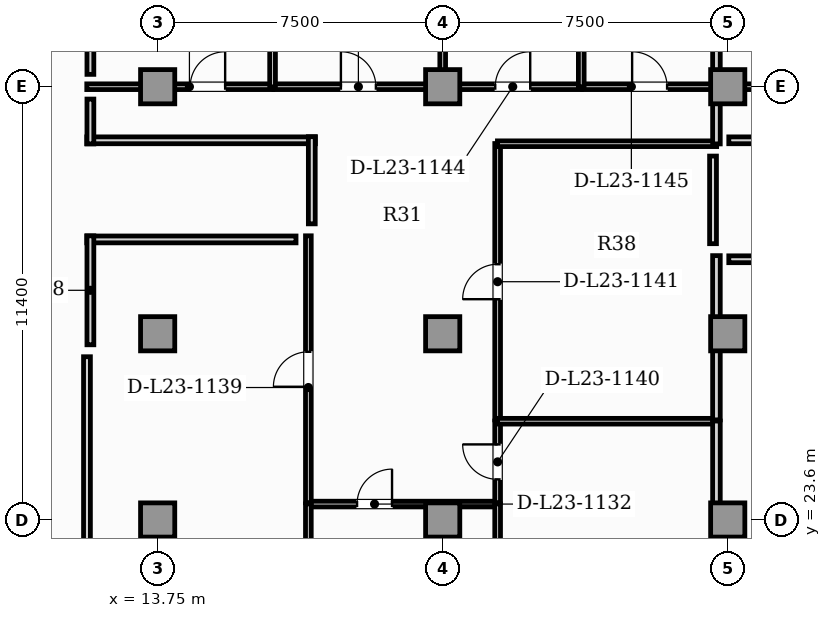
"""IFC4 building model, lengths in metres.
Left out: names, types, materials, properties, quantities, classifications, styles, units other than length and angle.
Written with IfcOpenShell. Run it as: python <this file> out.ifc"""

import sys

from ifc_helpers import new_model, si_unit, direction, frame, frame_2d, origin, origin_2d, place, context, subcontext, project, spatial, rectangle, extrude, element, fill, save


model = new_model("IFC4")
c1 = context("Model", 3, precision=1e-05, world=origin(), true_north=direction((0.0, 1.0)))
c2 = subcontext(c1, "Body", "Model", "MODEL_VIEW")
j1 = project(units=[si_unit("LENGTHUNIT", "METRE"), si_unit("PLANEANGLEUNIT", "RADIAN")], contexts=[c1])
p1 = place(None, origin())
s1 = spatial("IfcSite", under=j1, at=p1, CompositionType="ELEMENT")
p2 = place(p1, origin())
s2 = spatial("IfcBuilding", under=s1, at=p2, CompositionType="ELEMENT")
p3 = place(p2, frame((0.0, 0.0, 96.45)))
s3 = spatial("IfcBuildingStorey", under=s2, at=p3, CompositionType="ELEMENT", Elevation=96.45)
for number, where, z_axis, x_axis in (
    (1, (13.75, 23.6, 0.0), (0.0, 0.0, 1.0), (1.0, 0.0, 0.0)),
    (2, (21.25, 23.6, 0.0), (0.0, 0.0, 1.0), (1.0, 0.0, 0.0)),
    (3, (28.75, 23.6, 0.0), (0.0, 0.0, 1.0), (1.0, 0.0, 0.0)),
    (4, (13.75, 28.5, 0.0), (0.0, 0.0, 1.0), (1.0, 0.0, 0.0)),
    (5, (21.25, 28.5, 0.0), (0.0, 0.0, 1.0), (1.0, 0.0, 0.0)),
    (6, (28.75, 28.5, 0.0), (0.0, 0.0, 1.0), (1.0, 0.0, 0.0)),
    (7, (13.75, 35.0, 0.0), (0.0, 0.0, 1.0), (1.0, 0.0, 0.0)),
    (8, (21.25, 35.0, 0.0), (0.0, 0.0, 1.0), (1.0, 0.0, 0.0)),
    (9, (28.75, 35.0, 0.0), (0.0, 0.0, 1.0), (1.0, 0.0, 0.0)),
):
    element("IfcColumn", number, at=place(p3, frame(where, z_axis=z_axis, x_axis=x_axis)), inside=s3, PredefinedType="COLUMN", context=c2, shape_type="SweptSolid", body=[
        extrude(rectangle(XDim=0.9, YDim=0.9, at=origin_2d()), origin(), (0.0, 0.0, 1.0), 3.85),
    ])
p4 = place(p3, frame((11.89, 17.465, 0.0), z_axis=(0.0, 0.0, 1.0), x_axis=(0.0, 1.0, 0.0)))
e10 = element("IfcWall", 10, at=p4, inside=s3, PredefinedType="PARTITIONING", context=c2, shape_type="SweptSolid", body=[
    extrude(rectangle(XDim=10.43, YDim=0.18, at=frame_2d((5.215, 0.0))), origin(), (0.0, 0.0, 1.0), 3.6),
])
p5 = place(p3, frame((17.71, 24.019, 0.0), z_axis=(0.0, 0.0, 1.0), x_axis=(1.0, 0.0, 0.0)))
e11 = element("IfcWall", 11, at=p5, inside=s3, PredefinedType="PARTITIONING", context=c2, shape_type="SweptSolid", body=[
    extrude(rectangle(XDim=4.99, YDim=0.15, at=frame_2d((2.495, 0.0))), origin(), (0.0, 0.0, 1.0), 3.6),
])
p6 = place(p5, frame((1.287, 0.0, 0.0)))
e12 = element("IfcOpeningElement", 12, at=p6, cuts=e11, PredefinedType="OPENING", context=c2, shape_type="SweptSolid", body=[
    extrude(rectangle(XDim=0.92, YDim=2.1, at=frame_2d((0.46, 1.05))), frame((0.0, 0.085, 0.0), z_axis=(0.0, -1.0, 0.0), x_axis=(1.0, 0.0, 0.0)), (0.0, 0.0, 1.0), 0.17),
])
p7 = place(p3, frame((17.716, 17.465, 0.0), z_axis=(0.0, 0.0, 1.0), x_axis=(0.0, 1.0, 0.0)))
e13 = element("IfcWall", 13, at=p7, inside=s3, PredefinedType="PARTITIONING", context=c2, shape_type="SweptSolid", body=[
    extrude(rectangle(XDim=6.559, YDim=0.15, at=frame_2d((3.279, 0.0))), origin(), (0.0, 0.0, 1.0), 3.6),
])
p8 = place(p7, frame((2.819, 0.0, 0.0)))
e14 = element("IfcOpeningElement", 14, at=p8, cuts=e13, PredefinedType="OPENING", context=c2, shape_type="SweptSolid", body=[
    extrude(rectangle(XDim=0.92, YDim=2.1, at=frame_2d((0.46, 1.05))), frame((0.0, 0.085, 0.0), z_axis=(0.0, -1.0, 0.0), x_axis=(1.0, 0.0, 0.0)), (0.0, 0.0, 1.0), 0.17),
])
p9 = place(p3, frame((22.696, 20.97, 0.0), z_axis=(0.0, 0.0, 1.0), x_axis=(0.0, 1.0, 0.0)))
e15 = element("IfcWall", 15, at=p9, inside=s3, PredefinedType="PARTITIONING", context=c2, shape_type="SweptSolid", body=[
    extrude(rectangle(XDim=3.054, YDim=0.15, at=frame_2d((1.527, 0.0))), origin(), (0.0, 0.0, 1.0), 3.6),
])
p10 = place(p9, frame((1.067, 0.0, 0.0)))
e16 = element("IfcOpeningElement", 16, at=p10, cuts=e15, PredefinedType="OPENING", context=c2, shape_type="SweptSolid", body=[
    extrude(rectangle(XDim=0.92, YDim=2.1, at=frame_2d((0.46, 1.05))), frame((0.0, 0.085, 0.0), z_axis=(0.0, -1.0, 0.0), x_axis=(1.0, 0.0, 0.0)), (0.0, 0.0, 1.0), 0.17),
])
p11 = place(p3, frame((17.716, 24.054, 0.0), z_axis=(0.0, 0.0, 1.0), x_axis=(0.0, 1.0, 0.0)))
e17 = element("IfcWall", 17, at=p11, inside=s3, PredefinedType="PARTITIONING", context=c2, shape_type="SweptSolid", body=[
    extrude(rectangle(XDim=7.023, YDim=0.15, at=frame_2d((3.512, 0.0))), origin(), (0.0, 0.0, 1.0), 3.6),
])
p12 = place(p11, frame((3.052, 0.0, 0.0)))
e18 = element("IfcOpeningElement", 18, at=p12, cuts=e17, PredefinedType="OPENING", context=c2, shape_type="SweptSolid", body=[
    extrude(rectangle(XDim=0.92, YDim=2.1, at=frame_2d((0.46, 1.05))), frame((0.0, 0.085, 0.0), z_axis=(0.0, -1.0, 0.0), x_axis=(1.0, 0.0, 0.0)), (0.0, 0.0, 1.0), 0.17),
])
p13 = place(p3, frame((22.696, 24.054, 0.0), z_axis=(0.0, 0.0, 1.0), x_axis=(0.0, 1.0, 0.0)))
e19 = element("IfcWall", 19, at=p13, inside=s3, PredefinedType="PARTITIONING", context=c2, shape_type="SweptSolid", body=[
    extrude(rectangle(XDim=2.15, YDim=0.15, at=frame_2d((1.075, 0.0))), origin(), (0.0, 0.0, 1.0), 3.6),
])
p14 = place(p13, frame((0.615, 0.0, 0.0)))
e20 = element("IfcOpeningElement", 20, at=p14, cuts=e19, PredefinedType="OPENING", context=c2, shape_type="SweptSolid", body=[
    extrude(rectangle(XDim=0.92, YDim=2.1, at=frame_2d((0.46, 1.05))), frame((0.0, 0.085, 0.0), z_axis=(0.0, -1.0, 0.0), x_axis=(1.0, 0.0, 0.0)), (0.0, 0.0, 1.0), 0.17),
])
p15 = place(p3, frame((22.696, 26.234, 0.0), z_axis=(0.0, 0.0, 1.0), x_axis=(0.0, 1.0, 0.0)))
e21 = element("IfcWall", 21, at=p15, inside=s3, PredefinedType="PARTITIONING", context=c2, shape_type="SweptSolid", body=[
    extrude(rectangle(XDim=7.271, YDim=0.15, at=frame_2d((3.636, 0.0))), origin(), (0.0, 0.0, 1.0), 3.6),
])
p16 = place(p15, frame((3.176, 0.0, 0.0)))
e22 = element("IfcOpeningElement", 22, at=p16, cuts=e21, PredefinedType="OPENING", context=c2, shape_type="SweptSolid", body=[
    extrude(rectangle(XDim=0.92, YDim=2.1, at=frame_2d((0.46, 1.05))), frame((0.0, 0.085, 0.0), z_axis=(0.0, -1.0, 0.0), x_axis=(1.0, 0.0, 0.0)), (0.0, 0.0, 1.0), 0.17),
])
p17 = place(p3, frame((22.69, 33.5, 0.0), z_axis=(0.0, 0.0, 1.0), x_axis=(1.0, 0.0, 0.0)))
e23 = element("IfcWall", 23, at=p17, inside=s3, PredefinedType="PARTITIONING", context=c2, shape_type="SweptSolid", body=[
    extrude(rectangle(XDim=5.768, YDim=0.15, at=frame_2d((2.884, 0.0))), origin(), (0.0, 0.0, 1.0), 3.6),
])
p18 = place(p3, frame((11.885, 35.0, 0.0), z_axis=(0.0, 0.0, 1.0), x_axis=(1.0, 0.0, 0.0)))
e24 = element("IfcWall", 24, at=p18, inside=s3, PredefinedType="PARTITIONING", context=c2, shape_type="SweptSolid", body=[
    extrude(rectangle(XDim=4.893, YDim=0.15, at=frame_2d((2.447, 0.0))), origin(), (0.0, 0.0, 1.0), 2.983),
])
p19 = place(p18, frame((2.721, 0.0, 0.0)))
e25 = element("IfcOpeningElement", 25, at=p19, cuts=e24, PredefinedType="OPENING", context=c2, shape_type="SweptSolid", body=[
    extrude(rectangle(XDim=0.92, YDim=2.1, at=frame_2d((0.46, 1.05))), frame((0.0, 0.085, 0.0), z_axis=(0.0, -1.0, 0.0), x_axis=(1.0, 0.0, 0.0)), (0.0, 0.0, 1.0), 0.17),
])
p20 = place(p3, frame((16.808, 35.0, 0.0), z_axis=(0.0, 0.0, 1.0), x_axis=(1.0, 0.0, 0.0)))
e26 = element("IfcWall", 26, at=p20, inside=s3, PredefinedType="PARTITIONING", context=c2, shape_type="SweptSolid", body=[
    extrude(rectangle(XDim=4.447, YDim=0.15, at=frame_2d((2.223, 0.0))), origin(), (0.0, 0.0, 1.0), 2.983),
])
p21 = place(p20, frame((1.763, 0.0, 0.0)))
e27 = element("IfcOpeningElement", 27, at=p21, cuts=e26, PredefinedType="OPENING", context=c2, shape_type="SweptSolid", body=[
    extrude(rectangle(XDim=0.92, YDim=2.1, at=frame_2d((0.46, 1.05))), frame((0.0, 0.085, 0.0), z_axis=(0.0, -1.0, 0.0), x_axis=(1.0, 0.0, 0.0)), (0.0, 0.0, 1.0), 0.17),
])
p22 = place(p3, frame((21.285, 35.0, 0.0), z_axis=(0.0, 0.0, 1.0), x_axis=(1.0, 0.0, 0.0)))
e28 = element("IfcWall", 28, at=p22, inside=s3, PredefinedType="PARTITIONING", context=c2, shape_type="SweptSolid", body=[
    extrude(rectangle(XDim=3.616, YDim=0.15, at=frame_2d((1.808, 0.0))), origin(), (0.0, 0.0, 1.0), 2.983),
])
p23 = place(p22, frame((1.348, 0.0, 0.0)))
e29 = element("IfcOpeningElement", 29, at=p23, cuts=e28, PredefinedType="OPENING", context=c2, shape_type="SweptSolid", body=[
    extrude(rectangle(XDim=0.92, YDim=2.1, at=frame_2d((0.46, 1.05))), frame((0.0, 0.085, 0.0), z_axis=(0.0, -1.0, 0.0), x_axis=(1.0, 0.0, 0.0)), (0.0, 0.0, 1.0), 0.17),
])
p24 = place(p3, frame((24.931, 35.0, 0.0), z_axis=(0.0, 0.0, 1.0), x_axis=(1.0, 0.0, 0.0)))
e30 = element("IfcWall", 30, at=p24, inside=s3, PredefinedType="PARTITIONING", context=c2, shape_type="SweptSolid", body=[
    extrude(rectangle(XDim=3.527, YDim=0.15, at=frame_2d((1.764, 0.0))), origin(), (0.0, 0.0, 1.0), 2.983),
])
p25 = place(p24, frame((1.304, 0.0, 0.0)))
e31 = element("IfcOpeningElement", 31, at=p25, cuts=e30, PredefinedType="OPENING", context=c2, shape_type="SweptSolid", body=[
    extrude(rectangle(XDim=0.92, YDim=2.1, at=frame_2d((0.46, 1.05))), frame((0.0, 0.085, 0.0), z_axis=(0.0, -1.0, 0.0), x_axis=(1.0, 0.0, 0.0)), (0.0, 0.0, 1.0), 0.17),
])
p26 = place(p3, frame((28.453, 33.495, 0.0), z_axis=(0.0, 0.0, 1.0), x_axis=(0.0, 1.0, 0.0)))
e32 = element("IfcWall", 32, at=p26, inside=s3, PredefinedType="PARTITIONING", context=c2, shape_type="SweptSolid", body=[
    extrude(rectangle(XDim=1.51, YDim=0.2, at=frame_2d((0.755, 0.0))), origin(), (0.0, 0.0, 1.0), 3.6),
])
p27 = place(p3, frame((22.69, 26.198, 0.0), z_axis=(0.0, 0.0, 1.0), x_axis=(1.0, 0.0, 0.0)))
e33 = element("IfcWall", 33, at=p27, inside=s3, PredefinedType="PARTITIONING", context=c2, shape_type="SweptSolid", body=[
    extrude(rectangle(XDim=5.768, YDim=0.15, at=frame_2d((2.884, 0.0))), origin(), (0.0, 0.0, 1.0), 3.6),
])
p28 = place(p3, frame((28.453, 20.97, 0.0), z_axis=(0.0, 0.0, 1.0), x_axis=(0.0, 1.0, 0.0)))
e34 = element("IfcWall", 34, at=p28, inside=s3, PredefinedType="PARTITIONING", context=c2, shape_type="SweptSolid", body=[
    extrude(rectangle(XDim=5.234, YDim=0.2, at=frame_2d((2.617, 0.0))), origin(), (0.0, 0.0, 1.0), 3.6),
])
p29 = place(p3, frame((28.453, 26.234, 0.0), z_axis=(0.0, 0.0, 1.0), x_axis=(0.0, 1.0, 0.0)))
e35 = element("IfcWall", 35, at=p29, inside=s3, PredefinedType="PARTITIONING", context=c2, shape_type="SweptSolid", body=[
    extrude(rectangle(XDim=4.322, YDim=0.2, at=frame_2d((2.161, 0.0))), origin(), (0.0, 0.0, 1.0), 3.6),
])
p30 = place(p3, frame((16.773, 34.995, 0.0), z_axis=(0.0, 0.0, 1.0), x_axis=(0.0, 1.0, 0.0)))
e36 = element("IfcWall", 36, at=p30, inside=s3, PredefinedType="PARTITIONING", context=c2, shape_type="SweptSolid", body=[
    extrude(rectangle(XDim=7.907, YDim=0.15, at=frame_2d((3.954, 0.0))), origin(), (0.0, 0.0, 1.0), 3.6),
])
for number, where, z_axis, x_axis in (
    (37, (21.25, 34.995, 0.0), (0.0, 0.0, 1.0), (0.0, 1.0, 0.0)),
    (38, (24.896, 34.995, 0.0), (0.0, 0.0, 1.0), (0.0, 1.0, 0.0)),
):
    element("IfcWall", number, at=place(p3, frame(where, z_axis=z_axis, x_axis=x_axis)), inside=s3, PredefinedType="PARTITIONING", context=c2, shape_type="SweptSolid", body=[
        extrude(rectangle(XDim=7.995, YDim=0.15, at=frame_2d((3.998, 0.0))), origin(), (0.0, 0.0, 1.0), 3.6),
    ])
p31 = place(p3, frame((28.453, 35.035, 0.0), z_axis=(0.0, 0.0, 1.0), x_axis=(0.0, 1.0, 0.0)))
e39 = element("IfcWall", 39, at=p31, inside=s3, PredefinedType="PARTITIONING", context=c2, shape_type="SweptSolid", body=[
    extrude(rectangle(XDim=7.955, YDim=0.2, at=frame_2d((3.978, 0.0))), origin(), (0.0, 0.0, 1.0), 3.6),
])
p32 = place(p3, frame((28.488, 35.0, 0.0), z_axis=(0.0, 0.0, 1.0), x_axis=(1.0, 0.0, 0.0)))
e40 = element("IfcWall", 40, at=p32, inside=s3, PredefinedType="PARTITIONING", context=c2, shape_type="SweptSolid", body=[
    extrude(rectangle(XDim=5.03, YDim=0.15, at=frame_2d((2.515, 0.0))), origin(), (0.0, 0.0, 1.0), 2.983),
])
p33 = place(p32, frame((2.055, 0.0, 0.0)))
e41 = element("IfcOpeningElement", 41, at=p33, cuts=e40, PredefinedType="OPENING", context=c2, shape_type="SweptSolid", body=[
    extrude(rectangle(XDim=0.92, YDim=2.1, at=frame_2d((0.46, 1.05))), frame((0.0, 0.085, 0.0), z_axis=(0.0, -1.0, 0.0), x_axis=(1.0, 0.0, 0.0)), (0.0, 0.0, 1.0), 0.17),
])
p34 = place(p3, frame((17.9, 33.59, 0.0), z_axis=(0.0, 0.0, 1.0), x_axis=(-1.0, 0.0, 0.0)))
e42 = element("IfcWall", 42, at=p34, inside=s3, PredefinedType="PARTITIONING", context=c2, shape_type="SweptSolid", body=[
    extrude(rectangle(XDim=6.015, YDim=0.18, at=frame_2d((3.008, 0.0))), origin(), (0.0, 0.0, 1.0), 3.6),
])
p35 = place(p3, frame((11.98, 33.495, 0.0), z_axis=(0.0, 0.0, 1.0), x_axis=(0.0, 1.0, 0.0)))
e43 = element("IfcWall", 43, at=p35, inside=s3, PredefinedType="PARTITIONING", context=c2, shape_type="SweptSolid", body=[
    extrude(rectangle(XDim=1.18, YDim=0.18, at=frame_2d((0.59, 0.0))), origin(), (0.0, 0.0, 1.0), 3.6),
])
p36 = place(p3, frame((17.805, 31.392, 0.0), z_axis=(0.0, 0.0, 1.0), x_axis=(0.0, 1.0, 0.0)))
e44 = element("IfcWall", 44, at=p36, inside=s3, PredefinedType="PARTITIONING", context=c2, shape_type="SweptSolid", body=[
    extrude(rectangle(XDim=2.293, YDim=0.18, at=frame_2d((1.146, 0.0))), origin(), (0.0, 0.0, 1.0), 3.6),
])
p37 = place(p3, frame((11.885, 30.982, 0.0), z_axis=(0.0, 0.0, 1.0), x_axis=(1.0, 0.0, 0.0)))
e45 = element("IfcWall", 45, at=p37, inside=s3, PredefinedType="PARTITIONING", context=c2, shape_type="SweptSolid", body=[
    extrude(rectangle(XDim=5.505, YDim=0.18, at=frame_2d((2.753, 0.0))), origin(), (0.0, 0.0, 1.0), 3.6),
])
p38 = place(p3, frame((11.98, 28.21, 0.0), z_axis=(0.0, 0.0, 1.0), x_axis=(0.0, 1.0, 0.0)))
e46 = element("IfcWall", 46, at=p38, inside=s3, PredefinedType="PARTITIONING", context=c2, shape_type="SweptSolid", body=[
    extrude(rectangle(XDim=2.867, YDim=0.18, at=frame_2d((1.434, 0.0))), origin(), (0.0, 0.0, 1.0), 3.6),
])
p39 = place(p3, frame((28.363, 33.175, 0.0), z_axis=(0.0, 0.0, 1.0), x_axis=(0.0, -1.0, 0.0)))
e47 = element("IfcWall", 47, at=p39, inside=s3, PredefinedType="PARTITIONING", context=c2, shape_type="SweptSolid", body=[
    extrude(rectangle(XDim=2.305, YDim=0.18, at=frame_2d((1.152, 0.0))), origin(), (0.0, 0.0, 1.0), 3.6),
])
p40 = place(p3, frame((11.98, 35.325, 0.0), z_axis=(0.0, 0.0, 1.0), x_axis=(0.0, 1.0, 0.0)))
e48 = element("IfcWall", 48, at=p40, inside=s3, PredefinedType="PARTITIONING", context=c2, shape_type="SweptSolid", body=[
    extrude(rectangle(XDim=7.665, YDim=0.18, at=frame_2d((3.833, 0.0))), origin(), (0.0, 0.0, 1.0), 3.6),
])
p41 = place(p3, frame((34.691, 33.59, 0.0), z_axis=(0.0, 0.0, 1.0), x_axis=(-1.0, 0.0, 0.0)))
e49 = element("IfcWall", 49, at=p41, inside=s3, PredefinedType="PARTITIONING", context=c2, shape_type="SweptSolid", body=[
    extrude(rectangle(XDim=5.913, YDim=0.18, at=frame_2d((2.957, 0.0))), origin(), (0.0, 0.0, 1.0), 3.6),
])
p42 = place(p3, frame((28.778, 30.46, 0.0), z_axis=(0.0, 0.0, 1.0), x_axis=(1.0, 0.0, 0.0)))
e50 = element("IfcWall", 50, at=p42, inside=s3, PredefinedType="PARTITIONING", context=c2, shape_type="SweptSolid", body=[
    extrude(rectangle(XDim=5.403, YDim=0.18, at=frame_2d((2.702, 0.0))), origin(), (0.0, 0.0, 1.0), 3.6),
])
p43 = place(p6, origin())
e51 = element("IfcDoor", 51, at=p43, inside=s3, OperationType="SINGLE_SWING_RIGHT", PredefinedType="DOOR", context=c2, shape_type="SweptSolid", body=[
    extrude(rectangle(XDim=0.92, YDim=2.1, at=frame_2d((0.46, 1.05))), frame((0.0, 0.025, 0.0), z_axis=(0.0, -1.0, 0.0), x_axis=(1.0, 0.0, 0.0)), (0.0, 0.0, 1.0), 0.05),
])
fill(e12, e51)
p44 = place(p12, origin())
e52 = element("IfcDoor", 52, at=p44, inside=s3, OperationType="SINGLE_SWING_LEFT", PredefinedType="DOOR", context=c2, shape_type="SweptSolid", body=[
    extrude(rectangle(XDim=0.92, YDim=2.1, at=frame_2d((0.46, 1.05))), frame((0.0, 0.025, 0.0), z_axis=(0.0, -1.0, 0.0), x_axis=(1.0, 0.0, 0.0)), (0.0, 0.0, 1.0), 0.05),
])
fill(e18, e52)
p45 = place(p14, origin())
e53 = element("IfcDoor", 53, at=p45, inside=s3, OperationType="SINGLE_SWING_RIGHT", PredefinedType="DOOR", context=c2, shape_type="SweptSolid", body=[
    extrude(rectangle(XDim=0.92, YDim=2.1, at=frame_2d((0.46, 1.05))), frame((0.0, 0.025, 0.0), z_axis=(0.0, -1.0, 0.0), x_axis=(1.0, 0.0, 0.0)), (0.0, 0.0, 1.0), 0.05),
])
fill(e20, e53)
p46 = place(p16, origin())
e54 = element("IfcDoor", 54, at=p46, inside=s3, OperationType="SINGLE_SWING_LEFT", PredefinedType="DOOR", context=c2, shape_type="SweptSolid", body=[
    extrude(rectangle(XDim=0.92, YDim=2.1, at=frame_2d((0.46, 1.05))), frame((0.0, 0.025, 0.0), z_axis=(0.0, -1.0, 0.0), x_axis=(1.0, 0.0, 0.0)), (0.0, 0.0, 1.0), 0.05),
])
fill(e22, e54)
p47 = place(p19, origin())
e55 = element("IfcDoor", 55, at=p47, inside=s3, OperationType="SINGLE_SWING_RIGHT", PredefinedType="DOOR", context=c2, shape_type="SweptSolid", body=[
    extrude(rectangle(XDim=0.92, YDim=2.1, at=frame_2d((0.46, 1.05))), frame((0.0, 0.025, 0.0), z_axis=(0.0, -1.0, 0.0), x_axis=(1.0, 0.0, 0.0)), (0.0, 0.0, 1.0), 0.05),
])
fill(e25, e55)
p48 = place(p21, origin())
e56 = element("IfcDoor", 56, at=p48, inside=s3, OperationType="SINGLE_SWING_LEFT", PredefinedType="DOOR", context=c2, shape_type="SweptSolid", body=[
    extrude(rectangle(XDim=0.92, YDim=2.1, at=frame_2d((0.46, 1.05))), frame((0.0, 0.025, 0.0), z_axis=(0.0, -1.0, 0.0), x_axis=(1.0, 0.0, 0.0)), (0.0, 0.0, 1.0), 0.05),
])
fill(e27, e56)
p49 = place(p23, origin())
e57 = element("IfcDoor", 57, at=p49, inside=s3, OperationType="SINGLE_SWING_RIGHT", PredefinedType="DOOR", context=c2, shape_type="SweptSolid", body=[
    extrude(rectangle(XDim=0.92, YDim=2.1, at=frame_2d((0.46, 1.05))), frame((0.0, 0.025, 0.0), z_axis=(0.0, -1.0, 0.0), x_axis=(1.0, 0.0, 0.0)), (0.0, 0.0, 1.0), 0.05),
])
fill(e29, e57)
p50 = place(p25, origin())
e58 = element("IfcDoor", 58, at=p50, inside=s3, OperationType="SINGLE_SWING_LEFT", PredefinedType="DOOR", context=c2, shape_type="SweptSolid", body=[
    extrude(rectangle(XDim=0.92, YDim=2.1, at=frame_2d((0.46, 1.05))), frame((0.0, 0.025, 0.0), z_axis=(0.0, -1.0, 0.0), x_axis=(1.0, 0.0, 0.0)), (0.0, 0.0, 1.0), 0.05),
])
fill(e31, e58)
save(model, sys.argv[1])
